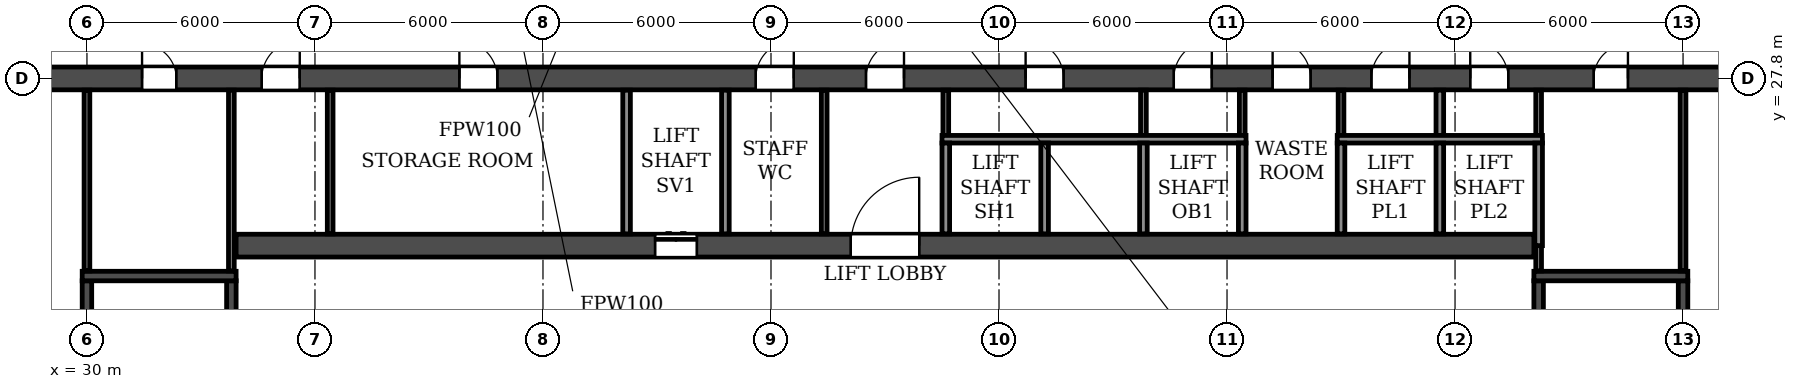
"""IFC4 building model, lengths in metres.
Left out: names, types, materials, properties, quantities, classifications, styles, units other than length and angle.
Written with IfcOpenShell. Run it as: python <this file> out.ifc"""

import sys

from ifc_helpers import new_model, si_unit, direction, frame, frame_2d, origin, place, context, subcontext, project, spatial, rectangle, extrude, element, fill, save


model = new_model("IFC4")
c1 = context("Model", 3, precision=1e-05, world=origin(), true_north=direction((0.0, 1.0)))
c2 = subcontext(c1, "Body", "Model", "MODEL_VIEW")
j1 = project(units=[si_unit("LENGTHUNIT", "METRE"), si_unit("PLANEANGLEUNIT", "RADIAN")], contexts=[c1])
p1 = place(None, origin())
s1 = spatial("IfcSite", under=j1, at=p1, CompositionType="ELEMENT")
p2 = place(p1, origin())
s2 = spatial("IfcBuilding", under=s1, at=p2, CompositionType="ELEMENT")
p3 = place(p2, frame((0.0, 0.0, 23.4)))
s3 = spatial("IfcBuildingStorey", under=s2, at=p3, CompositionType="ELEMENT", Elevation=23.4)
p4 = place(p3, frame((2.6, 27.8, 0.0), z_axis=(0.0, 0.0, 1.0), x_axis=(1.0, 0.0, 0.0)))
e1 = element("IfcWall", 1, at=p4, inside=s3, PredefinedType="SOLIDWALL", context=c2, shape_type="SweptSolid", body=[
    extrude(rectangle(XDim=96.8, YDim=0.6, at=frame_2d((48.4, 0.0))), origin(), (0.0, 0.0, 1.0), 3.05),
])
p5 = place(p4, frame((1.8, 0.0, 0.0)))
e2 = element("IfcOpeningElement", 2, at=p5, cuts=e1, PredefinedType="OPENING", context=c2, shape_type="SweptSolid", body=[
    extrude(rectangle(XDim=1.0, YDim=2.1, at=frame_2d((0.5, 1.05))), frame((0.0, 0.31, 0.0), z_axis=(0.0, -1.0, 0.0), x_axis=(1.0, 0.0, 0.0)), (0.0, 0.0, 1.0), 0.62),
])
p6 = place(p4, frame((9.5, 0.0, 0.0)))
e3 = element("IfcOpeningElement", 3, at=p6, cuts=e1, PredefinedType="OPENING", context=c2, shape_type="SweptSolid", body=[
    extrude(rectangle(XDim=1.0, YDim=2.1, at=frame_2d((0.5, 1.05))), frame((0.0, 0.31, 0.0), z_axis=(0.0, -1.0, 0.0), x_axis=(1.0, 0.0, 0.0)), (0.0, 0.0, 1.0), 0.62),
])
p7 = place(p4, frame((16.3, 0.0, 0.0)))
e4 = element("IfcOpeningElement", 4, at=p7, cuts=e1, PredefinedType="OPENING", context=c2, shape_type="SweptSolid", body=[
    extrude(rectangle(XDim=1.0, YDim=2.1, at=frame_2d((0.5, 1.05))), frame((0.0, 0.31, 0.0), z_axis=(0.0, -1.0, 0.0), x_axis=(1.0, 0.0, 0.0)), (0.0, 0.0, 1.0), 0.62),
])
p8 = place(p4, frame((19.65, 0.0, 0.0)))
e5 = element("IfcOpeningElement", 5, at=p8, cuts=e1, PredefinedType="OPENING", context=c2, shape_type="SweptSolid", body=[
    extrude(rectangle(XDim=0.9, YDim=2.1, at=frame_2d((0.45, 1.05))), frame((0.0, 0.31, 0.0), z_axis=(0.0, -1.0, 0.0), x_axis=(1.0, 0.0, 0.0)), (0.0, 0.0, 1.0), 0.62),
])
p9 = place(p4, frame((28.85, 0.0, 0.0)))
e6 = element("IfcOpeningElement", 6, at=p9, cuts=e1, PredefinedType="OPENING", context=c2, shape_type="SweptSolid", body=[
    extrude(rectangle(XDim=0.9, YDim=2.1, at=frame_2d((0.45, 1.05))), frame((0.0, 0.31, 0.0), z_axis=(0.0, -1.0, 0.0), x_axis=(1.0, 0.0, 0.0)), (0.0, 0.0, 1.0), 0.62),
])
p10 = place(p4, frame((32.0, 0.0, 0.0)))
e7 = element("IfcOpeningElement", 7, at=p10, cuts=e1, PredefinedType="OPENING", context=c2, shape_type="SweptSolid", body=[
    extrude(rectangle(XDim=1.0, YDim=2.1, at=frame_2d((0.5, 1.05))), frame((0.0, 0.31, 0.0), z_axis=(0.0, -1.0, 0.0), x_axis=(1.0, 0.0, 0.0)), (0.0, 0.0, 1.0), 0.62),
])
p11 = place(p4, frame((37.2, 0.0, 0.0)))
e8 = element("IfcOpeningElement", 8, at=p11, cuts=e1, PredefinedType="OPENING", context=c2, shape_type="SweptSolid", body=[
    extrude(rectangle(XDim=1.0, YDim=2.1, at=frame_2d((0.5, 1.05))), frame((0.0, 0.31, 0.0), z_axis=(0.0, -1.0, 0.0), x_axis=(1.0, 0.0, 0.0)), (0.0, 0.0, 1.0), 0.62),
])
p12 = place(p4, frame((45.0, 0.0, 0.0)))
e9 = element("IfcOpeningElement", 9, at=p12, cuts=e1, PredefinedType="OPENING", context=c2, shape_type="SweptSolid", body=[
    extrude(rectangle(XDim=1.0, YDim=2.1, at=frame_2d((0.5, 1.05))), frame((0.0, 0.31, 0.0), z_axis=(0.0, -1.0, 0.0), x_axis=(1.0, 0.0, 0.0)), (0.0, 0.0, 1.0), 0.62),
])
p13 = place(p4, frame((47.9, 0.0, 0.0)))
e10 = element("IfcOpeningElement", 10, at=p13, cuts=e1, PredefinedType="OPENING", context=c2, shape_type="SweptSolid", body=[
    extrude(rectangle(XDim=1.0, YDim=2.1, at=frame_2d((0.5, 1.05))), frame((0.0, 0.31, 0.0), z_axis=(0.0, -1.0, 0.0), x_axis=(1.0, 0.0, 0.0)), (0.0, 0.0, 1.0), 0.62),
])
p14 = place(p4, frame((52.1, 0.0, 0.0)))
e11 = element("IfcOpeningElement", 11, at=p14, cuts=e1, PredefinedType="OPENING", context=c2, shape_type="SweptSolid", body=[
    extrude(rectangle(XDim=1.0, YDim=2.1, at=frame_2d((0.5, 1.05))), frame((0.0, 0.31, 0.0), z_axis=(0.0, -1.0, 0.0), x_axis=(1.0, 0.0, 0.0)), (0.0, 0.0, 1.0), 0.62),
])
p15 = place(p4, frame((56.0, 0.0, 0.0)))
e12 = element("IfcOpeningElement", 12, at=p15, cuts=e1, PredefinedType="OPENING", context=c2, shape_type="SweptSolid", body=[
    extrude(rectangle(XDim=1.0, YDim=2.1, at=frame_2d((0.5, 1.05))), frame((0.0, 0.31, 0.0), z_axis=(0.0, -1.0, 0.0), x_axis=(1.0, 0.0, 0.0)), (0.0, 0.0, 1.0), 0.62),
])
p16 = place(p4, frame((58.6, 0.0, 0.0)))
e13 = element("IfcOpeningElement", 13, at=p16, cuts=e1, PredefinedType="OPENING", context=c2, shape_type="SweptSolid", body=[
    extrude(rectangle(XDim=1.0, YDim=2.1, at=frame_2d((0.5, 1.05))), frame((0.0, 0.31, 0.0), z_axis=(0.0, -1.0, 0.0), x_axis=(1.0, 0.0, 0.0)), (0.0, 0.0, 1.0), 0.62),
])
p17 = place(p4, frame((61.2, 0.0, 0.0)))
e14 = element("IfcOpeningElement", 14, at=p17, cuts=e1, PredefinedType="OPENING", context=c2, shape_type="SweptSolid", body=[
    extrude(rectangle(XDim=1.0, YDim=2.1, at=frame_2d((0.5, 1.05))), frame((0.0, 0.31, 0.0), z_axis=(0.0, -1.0, 0.0), x_axis=(1.0, 0.0, 0.0)), (0.0, 0.0, 1.0), 0.62),
])
p18 = place(p4, frame((63.8, 0.0, 0.0)))
e15 = element("IfcOpeningElement", 15, at=p18, cuts=e1, PredefinedType="OPENING", context=c2, shape_type="SweptSolid", body=[
    extrude(rectangle(XDim=1.0, YDim=2.1, at=frame_2d((0.5, 1.05))), frame((0.0, 0.31, 0.0), z_axis=(0.0, -1.0, 0.0), x_axis=(1.0, 0.0, 0.0)), (0.0, 0.0, 1.0), 0.62),
])
p19 = place(p4, frame((67.05, 0.0, 0.0)))
e16 = element("IfcOpeningElement", 16, at=p19, cuts=e1, PredefinedType="OPENING", context=c2, shape_type="SweptSolid", body=[
    extrude(rectangle(XDim=0.9, YDim=2.1, at=frame_2d((0.45, 1.05))), frame((0.0, 0.31, 0.0), z_axis=(0.0, -1.0, 0.0), x_axis=(1.0, 0.0, 0.0)), (0.0, 0.0, 1.0), 0.62),
])
p20 = place(p4, frame((76.25, 0.0, 0.0)))
e17 = element("IfcOpeningElement", 17, at=p20, cuts=e1, PredefinedType="OPENING", context=c2, shape_type="SweptSolid", body=[
    extrude(rectangle(XDim=0.9, YDim=2.1, at=frame_2d((0.45, 1.05))), frame((0.0, 0.31, 0.0), z_axis=(0.0, -1.0, 0.0), x_axis=(1.0, 0.0, 0.0)), (0.0, 0.0, 1.0), 0.62),
])
p21 = place(p4, frame((79.5, 0.0, 0.0)))
e18 = element("IfcOpeningElement", 18, at=p21, cuts=e1, PredefinedType="OPENING", context=c2, shape_type="SweptSolid", body=[
    extrude(rectangle(XDim=1.0, YDim=2.1, at=frame_2d((0.5, 1.05))), frame((0.0, 0.31, 0.0), z_axis=(0.0, -1.0, 0.0), x_axis=(1.0, 0.0, 0.0)), (0.0, 0.0, 1.0), 0.62),
])
p22 = place(p4, frame((88.6, 0.0, 0.0)))
e19 = element("IfcOpeningElement", 19, at=p22, cuts=e1, PredefinedType="OPENING", context=c2, shape_type="SweptSolid", body=[
    extrude(rectangle(XDim=1.0, YDim=2.1, at=frame_2d((0.5, 1.05))), frame((0.0, 0.31, 0.0), z_axis=(0.0, -1.0, 0.0), x_axis=(1.0, 0.0, 0.0)), (0.0, 0.0, 1.0), 0.62),
])
p23 = place(p3, frame((33.925, 23.4, 0.0), z_axis=(0.0, 0.0, 1.0), x_axis=(1.0, 0.0, 0.0)))
e20 = element("IfcWall", 20, at=p23, inside=s3, PredefinedType="SOLIDWALL", context=c2, shape_type="SweptSolid", body=[
    extrude(rectangle(XDim=34.15, YDim=0.6, at=frame_2d((17.075, 0.0))), origin(), (0.0, 0.0, 1.0), 3.05),
])
p24 = place(p23, frame((16.175, 0.0, 0.0)))
e21 = element("IfcOpeningElement", 21, at=p24, cuts=e20, PredefinedType="OPENING", context=c2, shape_type="SweptSolid", body=[
    extrude(rectangle(XDim=1.8, YDim=2.1, at=frame_2d((0.9, 1.05))), frame((0.0, 0.31, 0.0), z_axis=(0.0, -1.0, 0.0), x_axis=(1.0, 0.0, 0.0)), (0.0, 0.0, 1.0), 0.62),
])
p25 = place(p23, frame((11.025, 0.0, 0.0)))
e22 = element("IfcOpeningElement", 22, at=p25, cuts=e20, PredefinedType="OPENING", context=c2, shape_type="SweptSolid", body=[
    extrude(rectangle(XDim=1.1, YDim=2.1, at=frame_2d((0.55, 1.05))), frame((0.0, 0.31, 0.0), z_axis=(0.0, -1.0, 0.0), x_axis=(1.0, 0.0, 0.0)), (0.0, 0.0, 1.0), 0.62),
])
p26 = place(p3, frame((30.0, 14.9, 0.0), z_axis=(0.0, 0.0, 1.0), x_axis=(0.0, 1.0, 0.0)))
e23 = element("IfcWall", 23, at=p26, inside=s3, PredefinedType="SOLIDWALL", context=c2, shape_type="SweptSolid", body=[
    extrude(rectangle(XDim=7.575, YDim=0.25, at=frame_2d((3.788, 0.0))), origin(), (0.0, 0.0, 1.0), 3.05),
])
p27 = place(p3, frame((33.8, 14.9, 0.0), z_axis=(0.0, 0.0, 1.0), x_axis=(0.0, 1.0, 0.0)))
e24 = element("IfcWall", 24, at=p27, inside=s3, PredefinedType="SOLIDWALL", context=c2, shape_type="SweptSolid", body=[
    extrude(rectangle(XDim=7.575, YDim=0.25, at=frame_2d((3.788, 0.0))), origin(), (0.0, 0.0, 1.0), 3.05),
])
p28 = place(p27, frame((0.4, 0.0, 0.0)))
e25 = element("IfcOpeningElement", 25, at=p28, cuts=e24, PredefinedType="OPENING", context=c2, shape_type="SweptSolid", body=[
    extrude(rectangle(XDim=1.0, YDim=2.1, at=frame_2d((0.5, 1.05))), frame((0.0, 0.135, 0.0), z_axis=(0.0, -1.0, 0.0), x_axis=(1.0, 0.0, 0.0)), (0.0, 0.0, 1.0), 0.27),
])
p29 = place(p3, frame((29.875, 22.6, 0.0), z_axis=(0.0, 0.0, 1.0), x_axis=(1.0, 0.0, 0.0)))
e26 = element("IfcWall", 26, at=p29, inside=s3, PredefinedType="SOLIDWALL", context=c2, shape_type="SweptSolid", body=[
    extrude(rectangle(XDim=4.05, YDim=0.25, at=frame_2d((2.025, 0.0))), origin(), (0.0, 0.0, 1.0), 3.05),
])
p30 = place(p3, frame((68.2, 14.9, 0.0), z_axis=(0.0, 0.0, 1.0), x_axis=(0.0, 1.0, 0.0)))
e27 = element("IfcWall", 27, at=p30, inside=s3, PredefinedType="SOLIDWALL", context=c2, shape_type="SweptSolid", body=[
    extrude(rectangle(XDim=7.575, YDim=0.25, at=frame_2d((3.788, 0.0))), origin(), (0.0, 0.0, 1.0), 3.05),
])
p31 = place(p30, frame((0.4, 0.0, 0.0)))
e28 = element("IfcOpeningElement", 28, at=p31, cuts=e27, PredefinedType="OPENING", context=c2, shape_type="SweptSolid", body=[
    extrude(rectangle(XDim=1.0, YDim=2.1, at=frame_2d((0.5, 1.05))), frame((0.0, 0.135, 0.0), z_axis=(0.0, -1.0, 0.0), x_axis=(1.0, 0.0, 0.0)), (0.0, 0.0, 1.0), 0.27),
])
p32 = place(p3, frame((72.0, 14.9, 0.0), z_axis=(0.0, 0.0, 1.0), x_axis=(0.0, 1.0, 0.0)))
e29 = element("IfcWall", 29, at=p32, inside=s3, PredefinedType="SOLIDWALL", context=c2, shape_type="SweptSolid", body=[
    extrude(rectangle(XDim=7.575, YDim=0.25, at=frame_2d((3.788, 0.0))), origin(), (0.0, 0.0, 1.0), 3.05),
])
p33 = place(p3, frame((68.075, 22.6, 0.0), z_axis=(0.0, 0.0, 1.0), x_axis=(1.0, 0.0, 0.0)))
e30 = element("IfcWall", 30, at=p33, inside=s3, PredefinedType="SOLIDWALL", context=c2, shape_type="SweptSolid", body=[
    extrude(rectangle(XDim=4.05, YDim=0.25, at=frame_2d((2.025, 0.0))), origin(), (0.0, 0.0, 1.0), 3.05),
])
p34 = place(p3, frame((49.4, 23.71, 0.0), z_axis=(0.0, 0.0, 1.0), x_axis=(0.0, 1.0, 0.0)))
e31 = element("IfcWall", 31, at=p34, inside=s3, PredefinedType="PARTITIONING", context=c2, shape_type="SweptSolid", body=[
    extrude(rectangle(XDim=3.78, YDim=0.15, at=frame_2d((1.89, 0.0))), origin(), (0.0, 0.0, 1.0), 3.05),
])
p35 = place(p3, frame((52.6, 26.3, 0.0), z_axis=(0.0, 0.0, 1.0), x_axis=(0.0, 1.0, 0.0)))
e32 = element("IfcWall", 32, at=p35, inside=s3, PredefinedType="PARTITIONING", context=c2, shape_type="SweptSolid", body=[
    extrude(rectangle(XDim=1.19, YDim=0.15, at=frame_2d((0.595, 0.0))), origin(), (0.0, 0.0, 1.0), 3.05),
])
p36 = place(p3, frame((36.4, 23.71, 0.0), z_axis=(0.0, 0.0, 1.0), x_axis=(0.0, 1.0, 0.0)))
e33 = element("IfcWall", 33, at=p36, inside=s3, PredefinedType="PARTITIONING", context=c2, shape_type="SweptSolid", body=[
    extrude(rectangle(XDim=3.78, YDim=0.15, at=frame_2d((1.89, 0.0))), origin(), (0.0, 0.0, 1.0), 3.05),
])
for number, where, z_axis, x_axis in (
    (34, (57.8, 26.3, 0.0), (0.0, 0.0, 1.0), (0.0, 1.0, 0.0)),
    (35, (60.4, 26.3, 0.0), (0.0, 0.0, 1.0), (0.0, 1.0, 0.0)),
    (36, (63.0, 26.3, 0.0), (0.0, 0.0, 1.0), (0.0, 1.0, 0.0)),
):
    element("IfcWall", number, at=place(p3, frame(where, z_axis=z_axis, x_axis=x_axis)), inside=s3, PredefinedType="PARTITIONING", context=c2, shape_type="SweptSolid", body=[
        extrude(rectangle(XDim=1.19, YDim=0.15, at=frame_2d((0.595, 0.0))), origin(), (0.0, 0.0, 1.0), 3.05),
    ])
p37 = place(p3, frame((65.6, 26.3, 0.0), z_axis=(0.0, 0.0, 1.0), x_axis=(0.0, 1.0, 0.0)))
e37 = element("IfcWall", 37, at=p37, inside=s3, PredefinedType="PARTITIONING", context=c2, shape_type="SweptSolid", body=[
    extrude(rectangle(XDim=1.19, YDim=0.2, at=frame_2d((0.595, 0.0))), origin(), (0.0, 0.0, 1.0), 3.05),
])
for number, where, z_axis, x_axis in (
    (38, (30.0, 22.735, 0.0), (0.0, 0.0, 1.0), (0.0, 1.0, 0.0)),
    (39, (33.8, 22.735, 0.0), (0.0, 0.0, 1.0), (0.0, 1.0, 0.0)),
):
    element("IfcWall", number, at=place(p3, frame(where, z_axis=z_axis, x_axis=x_axis)), inside=s3, PredefinedType="PARTITIONING", context=c2, shape_type="SweptSolid", body=[
        extrude(rectangle(XDim=4.755, YDim=0.15, at=frame_2d((2.377, 0.0))), origin(), (0.0, 0.0, 1.0), 3.05),
    ])
p38 = place(p3, frame((68.2, 22.735, 0.0), z_axis=(0.0, 0.0, 1.0), x_axis=(0.0, 1.0, 0.0)))
e40 = element("IfcWall", 40, at=p38, inside=s3, PredefinedType="PARTITIONING", context=c2, shape_type="SweptSolid", body=[
    extrude(rectangle(XDim=0.665, YDim=0.15, at=frame_2d((0.333, 0.0))), origin(), (0.0, 0.0, 1.0), 3.05),
])
p39 = place(p3, frame((68.2, 26.3, 0.0), z_axis=(0.0, 0.0, 1.0), x_axis=(0.0, 1.0, 0.0)))
e41 = element("IfcWall", 41, at=p39, inside=s3, PredefinedType="PARTITIONING", context=c2, shape_type="SweptSolid", body=[
    extrude(rectangle(XDim=1.19, YDim=0.15, at=frame_2d((0.595, 0.0))), origin(), (0.0, 0.0, 1.0), 3.05),
])
p40 = place(p3, frame((72.0, 22.735, 0.0), z_axis=(0.0, 0.0, 1.0), x_axis=(0.0, 1.0, 0.0)))
e42 = element("IfcWall", 42, at=p40, inside=s3, PredefinedType="PARTITIONING", context=c2, shape_type="SweptSolid", body=[
    extrude(rectangle(XDim=4.755, YDim=0.15, at=frame_2d((2.377, 0.0))), origin(), (0.0, 0.0, 1.0), 3.05),
])
p41 = place(p3, frame((52.5, 26.2, 0.0), z_axis=(0.0, 0.0, 1.0), x_axis=(1.0, 0.0, 0.0)))
e43 = element("IfcWall", 43, at=p41, inside=s3, PredefinedType="PARTITIONING", context=c2, shape_type="SweptSolid", body=[
    extrude(rectangle(XDim=8.0, YDim=0.2, at=frame_2d((4.0, 0.0))), origin(), (0.0, 0.0, 1.0), 3.05),
])
p42 = place(p3, frame((62.9, 26.2, 0.0), z_axis=(0.0, 0.0, 1.0), x_axis=(1.0, 0.0, 0.0)))
e44 = element("IfcWall", 44, at=p42, inside=s3, PredefinedType="PARTITIONING", context=c2, shape_type="SweptSolid", body=[
    extrude(rectangle(XDim=5.4, YDim=0.2, at=frame_2d((2.7, 0.0))), origin(), (0.0, 0.0, 1.0), 3.05),
])
for number, where, z_axis, x_axis in (
    (45, (44.2, 23.71, 0.0), (0.0, 0.0, 1.0), (0.0, 1.0, 0.0)),
    (46, (46.8, 23.71, 0.0), (0.0, 0.0, 1.0), (0.0, 1.0, 0.0)),
):
    element("IfcWall", number, at=place(p3, frame(where, z_axis=z_axis, x_axis=x_axis)), inside=s3, PredefinedType="PARTITIONING", context=c2, shape_type="SweptSolid", body=[
        extrude(rectangle(XDim=3.78, YDim=0.2, at=frame_2d((1.89, 0.0))), origin(), (0.0, 0.0, 1.0), 3.05),
    ])
for number, where, z_axis, x_axis in (
    (47, (52.6, 23.71, 0.0), (0.0, 0.0, 1.0), (0.0, 1.0, 0.0)),
    (48, (55.2, 23.71, 0.0), (0.0, 0.0, 1.0), (0.0, 1.0, 0.0)),
    (49, (57.8, 23.71, 0.0), (0.0, 0.0, 1.0), (0.0, 1.0, 0.0)),
    (50, (60.4, 23.71, 0.0), (0.0, 0.0, 1.0), (0.0, 1.0, 0.0)),
    (51, (63.0, 23.71, 0.0), (0.0, 0.0, 1.0), (0.0, 1.0, 0.0)),
    (52, (65.6, 23.71, 0.0), (0.0, 0.0, 1.0), (0.0, 1.0, 0.0)),
):
    element("IfcWall", number, at=place(p3, frame(where, z_axis=z_axis, x_axis=x_axis)), inside=s3, PredefinedType="PARTITIONING", context=c2, shape_type="SweptSolid", body=[
        extrude(rectangle(XDim=2.39, YDim=0.2, at=frame_2d((1.195, 0.0))), origin(), (0.0, 0.0, 1.0), 3.05),
    ])
p43 = place(p3, frame((68.2, 23.4, 0.0), z_axis=(0.0, 0.0, 1.0), x_axis=(0.0, 1.0, 0.0)))
e53 = element("IfcWall", 53, at=p43, inside=s3, PredefinedType="PARTITIONING", context=c2, shape_type="SweptSolid", body=[
    extrude(rectangle(XDim=2.7, YDim=0.2, at=frame_2d((1.35, 0.0))), origin(), (0.0, 0.0, 1.0), 3.05),
])
p44 = place(p9, origin())
e54 = element("IfcDoor", 54, at=p44, inside=s3, OperationType="SINGLE_SWING_LEFT", PredefinedType="DOOR", context=c2, shape_type="SweptSolid", body=[
    extrude(rectangle(XDim=0.9, YDim=2.1, at=frame_2d((0.45, 1.05))), frame((0.0, 0.025, 0.0), z_axis=(0.0, -1.0, 0.0), x_axis=(1.0, 0.0, 0.0)), (0.0, 0.0, 1.0), 0.05),
])
fill(e6, e54)
p45 = place(p10, origin())
e55 = element("IfcDoor", 55, at=p45, inside=s3, OperationType="SINGLE_SWING_RIGHT", PredefinedType="DOOR", context=c2, shape_type="SweptSolid", body=[
    extrude(rectangle(XDim=1.0, YDim=2.1, at=frame_2d((0.5, 1.05))), frame((0.0, 0.025, 0.0), z_axis=(0.0, -1.0, 0.0), x_axis=(1.0, 0.0, 0.0)), (0.0, 0.0, 1.0), 0.05),
])
fill(e7, e55)
p46 = place(p11, origin())
e56 = element("IfcDoor", 56, at=p46, inside=s3, OperationType="SINGLE_SWING_LEFT", PredefinedType="DOOR", context=c2, shape_type="SweptSolid", body=[
    extrude(rectangle(XDim=1.0, YDim=2.1, at=frame_2d((0.5, 1.05))), frame((0.0, 0.025, 0.0), z_axis=(0.0, -1.0, 0.0), x_axis=(1.0, 0.0, 0.0)), (0.0, 0.0, 1.0), 0.05),
])
fill(e8, e56)
p47 = place(p12, origin())
e57 = element("IfcDoor", 57, at=p47, inside=s3, OperationType="SINGLE_SWING_RIGHT", PredefinedType="DOOR", context=c2, shape_type="SweptSolid", body=[
    extrude(rectangle(XDim=1.0, YDim=2.1, at=frame_2d((0.5, 1.05))), frame((0.0, 0.025, 0.0), z_axis=(0.0, -1.0, 0.0), x_axis=(1.0, 0.0, 0.0)), (0.0, 0.0, 1.0), 0.05),
])
fill(e9, e57)
p48 = place(p13, origin())
e58 = element("IfcDoor", 58, at=p48, inside=s3, OperationType="SINGLE_SWING_RIGHT", PredefinedType="DOOR", context=c2, shape_type="SweptSolid", body=[
    extrude(rectangle(XDim=1.0, YDim=2.1, at=frame_2d((0.5, 1.05))), frame((0.0, 0.025, 0.0), z_axis=(0.0, -1.0, 0.0), x_axis=(1.0, 0.0, 0.0)), (0.0, 0.0, 1.0), 0.05),
])
fill(e10, e58)
p49 = place(p14, origin())
e59 = element("IfcDoor", 59, at=p49, inside=s3, OperationType="SINGLE_SWING_LEFT", PredefinedType="DOOR", context=c2, shape_type="SweptSolid", body=[
    extrude(rectangle(XDim=1.0, YDim=2.1, at=frame_2d((0.5, 1.05))), frame((0.0, 0.025, 0.0), z_axis=(0.0, -1.0, 0.0), x_axis=(1.0, 0.0, 0.0)), (0.0, 0.0, 1.0), 0.05),
])
fill(e11, e59)
p50 = place(p15, origin())
e60 = element("IfcDoor", 60, at=p50, inside=s3, OperationType="SINGLE_SWING_RIGHT", PredefinedType="DOOR", context=c2, shape_type="SweptSolid", body=[
    extrude(rectangle(XDim=1.0, YDim=2.1, at=frame_2d((0.5, 1.05))), frame((0.0, 0.025, 0.0), z_axis=(0.0, -1.0, 0.0), x_axis=(1.0, 0.0, 0.0)), (0.0, 0.0, 1.0), 0.05),
])
fill(e12, e60)
p51 = place(p16, origin())
e61 = element("IfcDoor", 61, at=p51, inside=s3, OperationType="SINGLE_SWING_LEFT", PredefinedType="DOOR", context=c2, shape_type="SweptSolid", body=[
    extrude(rectangle(XDim=1.0, YDim=2.1, at=frame_2d((0.5, 1.05))), frame((0.0, 0.025, 0.0), z_axis=(0.0, -1.0, 0.0), x_axis=(1.0, 0.0, 0.0)), (0.0, 0.0, 1.0), 0.05),
])
fill(e13, e61)
p52 = place(p17, origin())
e62 = element("IfcDoor", 62, at=p52, inside=s3, OperationType="SINGLE_SWING_RIGHT", PredefinedType="DOOR", context=c2, shape_type="SweptSolid", body=[
    extrude(rectangle(XDim=1.0, YDim=2.1, at=frame_2d((0.5, 1.05))), frame((0.0, 0.025, 0.0), z_axis=(0.0, -1.0, 0.0), x_axis=(1.0, 0.0, 0.0)), (0.0, 0.0, 1.0), 0.05),
])
fill(e14, e62)
p53 = place(p18, origin())
e63 = element("IfcDoor", 63, at=p53, inside=s3, OperationType="SINGLE_SWING_LEFT", PredefinedType="DOOR", context=c2, shape_type="SweptSolid", body=[
    extrude(rectangle(XDim=1.0, YDim=2.1, at=frame_2d((0.5, 1.05))), frame((0.0, 0.025, 0.0), z_axis=(0.0, -1.0, 0.0), x_axis=(1.0, 0.0, 0.0)), (0.0, 0.0, 1.0), 0.05),
])
fill(e15, e63)
p54 = place(p19, origin())
e64 = element("IfcDoor", 64, at=p54, inside=s3, OperationType="SINGLE_SWING_RIGHT", PredefinedType="DOOR", context=c2, shape_type="SweptSolid", body=[
    extrude(rectangle(XDim=0.9, YDim=2.1, at=frame_2d((0.45, 1.05))), frame((0.0, 0.025, 0.0), z_axis=(0.0, -1.0, 0.0), x_axis=(1.0, 0.0, 0.0)), (0.0, 0.0, 1.0), 0.05),
])
fill(e16, e64)
p55 = place(p24, origin())
e65 = element("IfcDoor", 65, at=p55, inside=s3, OperationType="DOUBLE_DOOR_SINGLE_SWING", PredefinedType="DOOR", context=c2, shape_type="SweptSolid", body=[
    extrude(rectangle(XDim=1.8, YDim=2.1, at=frame_2d((0.9, 1.05))), frame((0.0, 0.025, 0.0), z_axis=(0.0, -1.0, 0.0), x_axis=(1.0, 0.0, 0.0)), (0.0, 0.0, 1.0), 0.05),
])
fill(e21, e65)
p56 = place(p25, origin())
e66 = element("IfcDoor", 66, at=p56, inside=s3, OperationType="DOUBLE_DOOR_SLIDING", PredefinedType="DOOR", context=c2, shape_type="SweptSolid", body=[
    extrude(rectangle(XDim=1.1, YDim=2.1, at=frame_2d((0.55, 1.05))), frame((0.0, 0.025, 0.0), z_axis=(0.0, -1.0, 0.0), x_axis=(1.0, 0.0, 0.0)), (0.0, 0.0, 1.0), 0.05),
])
fill(e22, e66)
save(model, sys.argv[1])
